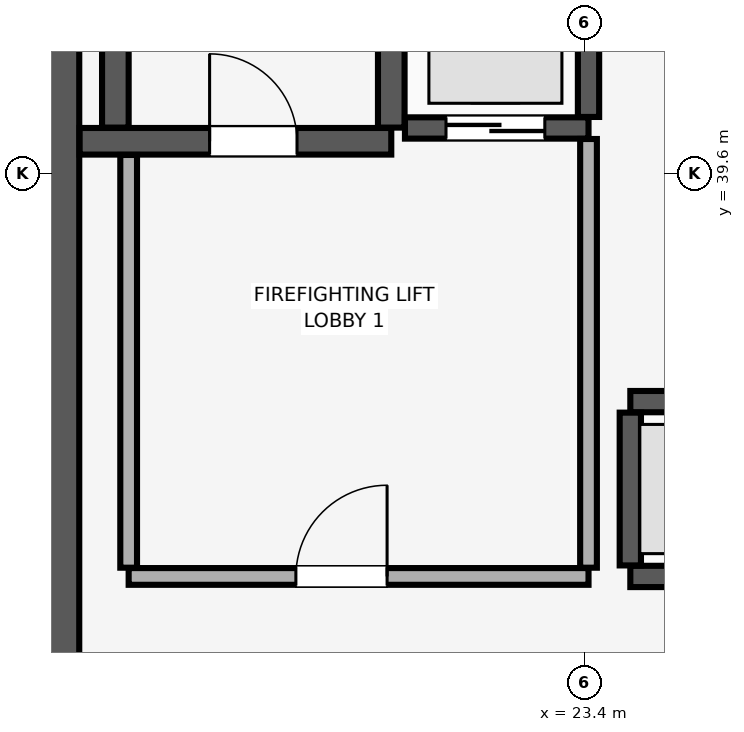
"""IFC4 building model, lengths in metres.
Left out: names, types, materials, properties, quantities, classifications, styles, units other than length and angle.
Written with IfcOpenShell. Run it as: python <this file> out.ifc"""

import sys

from ifc_helpers import new_model, si_unit, direction, frame, frame_2d, origin, place, context, subcontext, project, spatial, rectangle, extrude, element, fill, save


model = new_model("IFC4")
c1 = context("Model", 3, precision=1e-05, world=origin(), true_north=direction((0.0, 1.0)))
c2 = subcontext(c1, "Body", "Model", "MODEL_VIEW")
j1 = project(units=[si_unit("LENGTHUNIT", "METRE"), si_unit("PLANEANGLEUNIT", "RADIAN")], contexts=[c1])
p1 = place(None, origin())
s1 = spatial("IfcSite", under=j1, at=p1, CompositionType="ELEMENT")
p2 = place(p1, origin())
s2 = spatial("IfcBuilding", under=s1, at=p2, CompositionType="ELEMENT")
p3 = place(p2, frame((0.0, 0.0, 76.4)))
s3 = spatial("IfcBuildingStorey", under=s2, at=p3, CompositionType="ELEMENT", Elevation=76.4)
p4 = place(p3, frame((16.2, 29.4, 0.0), z_axis=(0.0, 0.0, 1.0), x_axis=(0.0, 1.0, 0.0)))
e1 = element("IfcWall", 1, at=p4, inside=s3, PredefinedType="SHEAR", context=c2, shape_type="SweptSolid", body=[
    extrude(rectangle(XDim=19.2, YDim=1.1, at=frame_2d((9.6, 0.0))), origin(), (0.0, 0.0, 1.0), 3.4),
])
p5 = place(p3, frame((16.755, 40.025, 0.0), z_axis=(0.0, 0.0, 1.0), x_axis=(1.0, 0.0, 0.0)))
e2 = element("IfcWall", 2, at=p5, inside=s3, PredefinedType="SHEAR", context=c2, shape_type="SweptSolid", body=[
    extrude(rectangle(XDim=4.1, YDim=0.35, at=frame_2d((2.05, 0.0))), origin(), (0.0, 0.0, 1.0), 3.4),
])
p6 = place(p5, frame((1.71, 0.0, 0.0)))
e3 = element("IfcOpeningElement", 3, at=p6, cuts=e2, PredefinedType="OPENING", context=c2, shape_type="SweptSolid", body=[
    extrude(rectangle(XDim=1.15, YDim=2.15, at=frame_2d((0.575, 1.075))), frame((0.0, 0.185, 0.0), z_axis=(0.0, -1.0, 0.0), x_axis=(1.0, 0.0, 0.0)), (0.0, 0.0, 1.0), 0.37),
])
for number, where, z_axis, x_axis in (
    (4, (17.225, 40.205, 0.0), (0.0, 0.0, 1.0), (0.0, 1.0, 0.0)),
    (5, (20.855, 40.205, 0.0), (0.0, 0.0, 1.0), (0.0, 1.0, 0.0)),
):
    element("IfcWall", number, at=place(p3, frame(where, z_axis=z_axis, x_axis=x_axis)), inside=s3, PredefinedType="SHEAR", context=c2, shape_type="SweptSolid", body=[
        extrude(rectangle(XDim=8.09, YDim=0.35, at=frame_2d((4.045, 0.0))), origin(), (0.0, 0.0, 1.0), 3.4),
    ])
p7 = place(p3, frame((24.0, 34.3, 0.0), z_axis=(0.0, 0.0, 1.0), x_axis=(1.0, 0.0, 0.0)))
e6 = element("IfcWall", 6, at=p7, inside=s3, PredefinedType="SHEAR", context=c2, shape_type="SweptSolid", body=[
    extrude(rectangle(XDim=2.3, YDim=0.28, at=frame_2d((1.15, 0.0))), origin(), (0.0, 0.0, 1.0), 3.4),
])
p8 = place(p7, frame((0.6, 0.0, 0.0)))
e7 = element("IfcOpeningElement", 7, at=p8, cuts=e6, PredefinedType="OPENING", context=c2, shape_type="SweptSolid", body=[
    extrude(rectangle(XDim=1.1, YDim=2.2, at=frame_2d((0.55, 1.1))), frame((0.0, 0.15, 0.0), z_axis=(0.0, -1.0, 0.0), x_axis=(1.0, 0.0, 0.0)), (0.0, 0.0, 1.0), 0.3),
])
p9 = place(p3, frame((24.0, 36.6, 0.0), z_axis=(0.0, 0.0, 1.0), x_axis=(1.0, 0.0, 0.0)))
e8 = element("IfcWall", 8, at=p9, inside=s3, PredefinedType="SHEAR", context=c2, shape_type="SweptSolid", body=[
    extrude(rectangle(XDim=2.3, YDim=0.28, at=frame_2d((1.15, 0.0))), origin(), (0.0, 0.0, 1.0), 3.4),
])
p10 = place(p3, frame((24.0, 34.445, 0.0), z_axis=(0.0, 0.0, 1.0), x_axis=(0.0, 1.0, 0.0)))
e9 = element("IfcWall", 9, at=p10, inside=s3, PredefinedType="SHEAR", context=c2, shape_type="SweptSolid", body=[
    extrude(rectangle(XDim=2.01, YDim=0.28, at=frame_2d((1.005, 0.0))), origin(), (0.0, 0.0, 1.0), 3.4),
])
p11 = place(p3, frame((21.035, 40.2, 0.0), z_axis=(0.0, 0.0, 1.0), x_axis=(1.0, 0.0, 0.0)))
e10 = element("IfcWall", 10, at=p11, inside=s3, PredefinedType="SHEAR", context=c2, shape_type="SweptSolid", body=[
    extrude(rectangle(XDim=2.415, YDim=0.28, at=frame_2d((1.208, 0.0))), origin(), (0.0, 0.0, 1.0), 3.4),
])
p12 = place(p11, frame((0.54, 0.0, 0.0)))
e11 = element("IfcOpeningElement", 11, at=p12, cuts=e10, PredefinedType="OPENING", context=c2, shape_type="SweptSolid", body=[
    extrude(rectangle(XDim=1.3, YDim=2.3, at=frame_2d((0.65, 1.15))), frame((0.0, 0.15, 0.0), z_axis=(0.0, -1.0, 0.0), x_axis=(1.0, 0.0, 0.0)), (0.0, 0.0, 1.0), 0.3),
])
p13 = place(p3, frame((23.45, 40.345, 0.0), z_axis=(0.0, 0.0, 1.0), x_axis=(0.0, 1.0, 0.0)))
e12 = element("IfcWall", 12, at=p13, inside=s3, PredefinedType="SHEAR", context=c2, shape_type="SweptSolid", body=[
    extrude(rectangle(XDim=2.81, YDim=0.28, at=frame_2d((1.405, 0.0))), origin(), (0.0, 0.0, 1.0), 3.4),
])
p14 = place(p3, frame((17.4, 34.3, 0.0), z_axis=(0.0, 0.0, 1.0), x_axis=(1.0, 0.0, 0.0)))
e13 = element("IfcWall", 13, at=p14, inside=s3, PredefinedType="PARTITIONING", context=c2, shape_type="SweptSolid", body=[
    extrude(rectangle(XDim=6.05, YDim=0.22, at=frame_2d((3.025, 0.0))), origin(), (0.0, 0.0, 1.0), 3.4),
])
p15 = place(p14, frame((2.2, 0.0, 0.0)))
e14 = element("IfcOpeningElement", 14, at=p15, cuts=e13, PredefinedType="OPENING", context=c2, shape_type="SweptSolid", body=[
    extrude(rectangle(XDim=1.2, YDim=2.15, at=frame_2d((0.6, 1.075))), frame((0.0, 0.12, 0.0), z_axis=(0.0, -1.0, 0.0), x_axis=(1.0, 0.0, 0.0)), (0.0, 0.0, 1.0), 0.24),
])
p16 = place(p3, frame((17.4, 34.415, 0.0), z_axis=(0.0, 0.0, 1.0), x_axis=(0.0, 1.0, 0.0)))
e15 = element("IfcWall", 15, at=p16, inside=s3, PredefinedType="PARTITIONING", context=c2, shape_type="SweptSolid", body=[
    extrude(rectangle(XDim=5.43, YDim=0.22, at=frame_2d((2.715, 0.0))), origin(), (0.0, 0.0, 1.0), 3.4),
])
p17 = place(p3, frame((23.45, 34.415, 0.0), z_axis=(0.0, 0.0, 1.0), x_axis=(0.0, 1.0, 0.0)))
e16 = element("IfcWall", 16, at=p17, inside=s3, PredefinedType="PARTITIONING", context=c2, shape_type="SweptSolid", body=[
    extrude(rectangle(XDim=5.64, YDim=0.22, at=frame_2d((2.82, 0.0))), origin(), (0.0, 0.0, 1.0), 3.4),
])
p18 = place(p6, origin())
e17 = element("IfcDoor", 17, at=p18, inside=s3, OperationType="SINGLE_SWING_LEFT", PredefinedType="DOOR", context=c2, shape_type="SweptSolid", body=[
    extrude(rectangle(XDim=1.15, YDim=2.15, at=frame_2d((0.575, 1.075))), frame((0.0, 0.025, 0.0), z_axis=(0.0, -1.0, 0.0), x_axis=(1.0, 0.0, 0.0)), (0.0, 0.0, 1.0), 0.05),
])
fill(e3, e17)
p19 = place(p12, origin())
e18 = element("IfcDoor", 18, at=p19, inside=s3, OperationType="DOUBLE_DOOR_SLIDING", PredefinedType="DOOR", context=c2, shape_type="SweptSolid", body=[
    extrude(rectangle(XDim=1.3, YDim=2.3, at=frame_2d((0.65, 1.15))), frame((0.0, 0.025, 0.0), z_axis=(0.0, -1.0, 0.0), x_axis=(1.0, 0.0, 0.0)), (0.0, 0.0, 1.0), 0.05),
])
fill(e11, e18)
p20 = place(p15, origin())
e19 = element("IfcDoor", 19, at=p20, inside=s3, OperationType="SINGLE_SWING_RIGHT", PredefinedType="DOOR", context=c2, shape_type="SweptSolid", body=[
    extrude(rectangle(XDim=1.2, YDim=2.15, at=frame_2d((0.6, 1.075))), frame((0.0, 0.025, 0.0), z_axis=(0.0, -1.0, 0.0), x_axis=(1.0, 0.0, 0.0)), (0.0, 0.0, 1.0), 0.05),
])
fill(e14, e19)
save(model, sys.argv[1])
